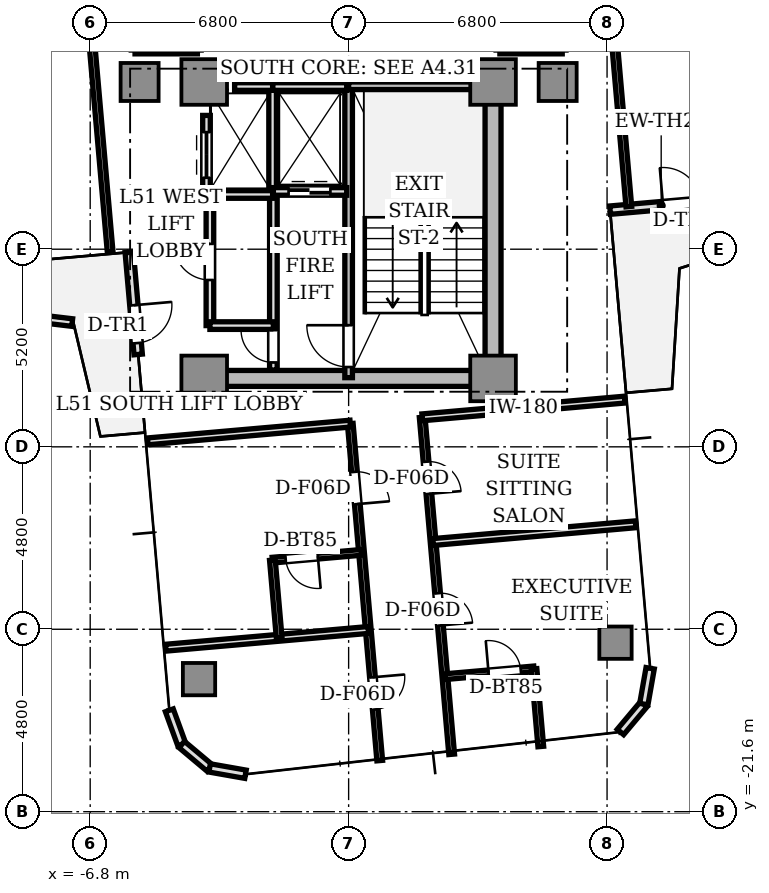
"""IFC4 building model, lengths in metres.
Left out: names, types, materials, properties, quantities, classifications, styles, units other than length and angle.
Written with IfcOpenShell. Run it as: python <this file> out.ifc"""

import sys

from ifc_helpers import new_model, si_unit, direction, frame, frame_2d, origin, origin_2d, place, context, subcontext, project, spatial, rectangle, extrude, source, transform, mapped, element, fill, save


model = new_model("IFC4")
c1 = context("Model", 3, precision=1e-05, world=origin(), true_north=direction((0.0, 1.0)))
c2 = subcontext(c1, "Body", "Model", "MODEL_VIEW")
j1 = project(units=[si_unit("LENGTHUNIT", "METRE"), si_unit("PLANEANGLEUNIT", "RADIAN")], contexts=[c1])
p1 = place(None, origin())
s1 = spatial("IfcSite", under=j1, at=p1, CompositionType="ELEMENT")
p2 = place(p1, origin())
s2 = spatial("IfcBuilding", under=s1, at=p2, CompositionType="ELEMENT")
p3 = place(p2, frame((0.0, 0.0, 185.25)))
s3 = spatial("IfcBuildingStorey", under=s2, at=p3, CompositionType="ELEMENT", Elevation=185.25)
p4 = place(p3, frame((-3.55, -10.2, 0.0), z_axis=(0.0, 0.0, 1.0), x_axis=(1.0, 0.0, 0.0)))
e1 = element("IfcWall", 1, at=p4, inside=s3, PredefinedType="SHEAR", context=c2, shape_type="SweptSolid", body=[
    extrude(rectangle(XDim=7.1, YDim=0.42, at=frame_2d((3.55, 0.0))), origin(), (0.0, 0.0, 1.0), 3.11),
])
p5 = place(p3, frame((3.8, -9.75, 0.0), z_axis=(0.0, 0.0, 1.0), x_axis=(0.0, 1.0, 0.0)))
e2 = element("IfcWall", 2, at=p5, inside=s3, PredefinedType="SHEAR", context=c2, shape_type="SweptSolid", body=[
    extrude(rectangle(XDim=6.9, YDim=0.42, at=frame_2d((3.45, 0.0))), origin(), (0.0, 0.0, 1.0), 3.11),
])
m1 = source(origin(), c2, "Body", "SweptSolid", [
    extrude(rectangle(XDim=1.2, YDim=1.2, at=origin_2d()), origin(), (0.0, 0.0, 1.0), 3.11),
])
for number, where, z_axis, x_axis in (
    (3, (-3.8, -2.4, 0.0), (0.0, 0.0, 1.0), (1.0, 0.0, 0.0)),
    (4, (3.8, -2.4, 0.0), (0.0, 0.0, 1.0), (1.0, 0.0, 0.0)),
    (5, (-3.8, -10.2, 0.0), (0.0, 0.0, 1.0), (1.0, 0.0, 0.0)),
    (6, (3.8, -10.2, 0.0), (0.0, 0.0, 1.0), (1.0, 0.0, 0.0)),
):
    element("IfcColumn", number, at=place(p3, frame(where, z_axis=z_axis, x_axis=x_axis)), inside=s3, PredefinedType="COLUMN", context=c2, shape_type="MappedRepresentation", body=[
        mapped(m1, transform((0.0, 0.0, 0.0), scale=1.0)),
    ])
m2 = source(origin(), c2, "Body", "SweptSolid", [
    extrude(rectangle(XDim=1.0, YDim=1.0, at=origin_2d()), origin(), (0.0, 0.0, 1.0), 3.11),
])
for number, where, z_axis, x_axis in (
    (7, (5.5, -2.4, 0.0), (0.0, 0.0, 1.0), (1.0, 0.0, 0.0)),
    (8, (-5.5, -2.4, 0.0), (0.0, 0.0, 1.0), (1.0, 0.0, 0.0)),
):
    element("IfcColumn", number, at=place(p3, frame(where, z_axis=z_axis, x_axis=x_axis)), inside=s3, PredefinedType="COLUMN", context=c2, shape_type="MappedRepresentation", body=[
        mapped(m2, transform((0.0, 0.0, 0.0), scale=1.0)),
    ])
m3 = source(origin(), c2, "Body", "SweptSolid", [
    extrude(rectangle(XDim=0.85, YDim=0.85, at=origin_2d()), origin(), (0.0, 0.0, 1.0), 3.11),
])
for number, where, z_axis, x_axis in (
    (9, (-3.936, -18.112, 0.0), (0.0, 0.0, 1.0), (1.0, 0.0, 0.0)),
    (10, (7.022, -17.153, 0.0), (0.0, 0.0, 1.0), (1.0, 0.0, 0.0)),
):
    element("IfcColumn", number, at=place(p3, frame(where, z_axis=z_axis, x_axis=x_axis)), inside=s3, PredefinedType="COLUMN", context=c2, shape_type="MappedRepresentation", body=[
        mapped(m3, transform((0.0, 0.0, 0.0), scale=1.0)),
    ])
p6 = place(p3, frame((6.879, -5.772, 0.0), z_axis=(0.0, 0.0, 1.0), x_axis=(0.996193619346, 0.087168071984, 0.0)))
e11 = element("IfcWall", 11, at=p6, inside=s3, PredefinedType="STANDARD", context=c2, shape_type="SweptSolid", body=[
    extrude(rectangle(XDim=2.7, YDim=0.22, at=frame_2d((1.35, 0.0))), origin(), (0.0, 0.0, 1.0), 3.11),
])
p7 = place(p6, frame((1.4, 0.0, 0.0)))
e12 = element("IfcOpeningElement", 12, at=p7, cuts=e11, PredefinedType="OPENING", context=c2, shape_type="SweptSolid", body=[
    extrude(rectangle(XDim=1.0, YDim=2.2, at=frame_2d((0.5, 1.1))), frame((0.0, 0.12, 0.0), z_axis=(0.0, -1.0, 0.0), x_axis=(1.0, 0.0, 0.0)), (0.0, 0.0, 1.0), 0.24),
])
p8 = place(p3, frame((-5.772, -6.879, 0.0), z_axis=(0.0, 0.0, 1.0), x_axis=(0.087168071984, -0.996193619346, 0.0)))
e13 = element("IfcWall", 13, at=p8, inside=s3, PredefinedType="STANDARD", context=c2, shape_type="SweptSolid", body=[
    extrude(rectangle(XDim=2.7, YDim=0.22, at=frame_2d((1.35, 0.0))), origin(), (0.0, 0.0, 1.0), 3.11),
])
p9 = place(p8, frame((1.4, 0.0, 0.0)))
e14 = element("IfcOpeningElement", 14, at=p9, cuts=e13, PredefinedType="OPENING", context=c2, shape_type="SweptSolid", body=[
    extrude(rectangle(XDim=1.0, YDim=2.2, at=frame_2d((0.5, 1.1))), frame((0.0, 0.12, 0.0), z_axis=(0.0, -1.0, 0.0), x_axis=(1.0, 0.0, 0.0)), (0.0, 0.0, 1.0), 0.24),
])
p10 = place(p3, frame((-4.718, -18.933, 0.0), z_axis=(0.0, 0.0, 1.0), x_axis=(0.34188635151, -0.939741306239, 0.0)))
e15 = element("IfcWall", 15, at=p10, inside=s3, PredefinedType="STANDARD", context=c2, shape_type="SweptSolid", body=[
    extrude(rectangle(XDim=0.958, YDim=0.22, at=frame_2d((0.479, 0.0))), origin(), (0.0, 0.0, 1.0), 3.11),
])
for number, where, z_axis, x_axis in (
    (16, (-4.39, -19.833, 0.0), (0.0, 0.0, 1.0), (0.766, -0.643, 0.0)),
    (17, (-3.657, -20.449, 0.0), (0.0, 0.0, 1.0), (0.985, -0.174, 0.0)),
):
    element("IfcWall", number, at=place(p3, frame(where, z_axis=z_axis, x_axis=x_axis)), inside=s3, PredefinedType="STANDARD", context=c2, shape_type="SweptSolid", body=[
        extrude(rectangle(XDim=0.958, YDim=0.22, at=frame_2d((0.479, 0.0))), origin(), (0.0, 0.0, 1.0), 3.11),
    ])
for number, where, z_axis, x_axis in (
    (18, (7.152, -19.503, 0.0), (0.0, 0.0, 1.0), (0.643, 0.766, 0.0)),
    (19, (7.768, -18.769, 0.0), (0.0, 0.0, 1.0), (0.174, 0.985, 0.0)),
):
    element("IfcWall", number, at=place(p3, frame(where, z_axis=z_axis, x_axis=x_axis)), inside=s3, PredefinedType="STANDARD", context=c2, shape_type="SweptSolid", body=[
        extrude(rectangle(XDim=0.958, YDim=0.22, at=frame_2d((0.479, 0.0))), origin(), (0.0, 0.0, 1.0), 3.11),
    ])
p11 = place(p3, frame((-9.104, -8.512, 0.0), z_axis=(0.0, 0.0, 1.0), x_axis=(0.993023408226, -0.117917389369, 0.0)))
e20 = element("IfcWall", 20, at=p11, inside=s3, PredefinedType="PARAPET", context=c2, shape_type="SweptSolid", body=[
    extrude(rectangle(XDim=1.843, YDim=0.2, at=frame_2d((0.921, 0.0))), origin(), (0.0, 0.0, 1.0), 0.65),
])
p12 = place(p3, frame((0.0, -10.18, 0.0), z_axis=(0.0, 0.0, 1.0), x_axis=(0.0, 1.0, 0.0)))
e21 = element("IfcWall", 21, at=p12, inside=s3, PredefinedType="SOLIDWALL", context=c2, shape_type="SweptSolid", body=[
    extrude(rectangle(XDim=7.68, YDim=0.2, at=frame_2d((3.84, 0.0))), origin(), (0.0, 0.0, 1.0), 3.11),
])
p13 = place(p12, frame((0.28, 0.0, 0.0)))
e22 = element("IfcOpeningElement", 22, at=p13, cuts=e21, PredefinedType="OPENING", context=c2, shape_type="SweptSolid", body=[
    extrude(rectangle(XDim=1.1, YDim=2.15, at=frame_2d((0.55, 1.075))), frame((0.0, 0.11, 0.0), z_axis=(0.0, -1.0, 0.0), x_axis=(1.0, 0.0, 0.0)), (0.0, 0.0, 1.0), 0.22),
])
p14 = place(p3, frame((0.0, -2.5, 0.0), z_axis=(0.0, 0.0, 1.0), x_axis=(1.0, 0.0, 0.0)))
e23 = element("IfcWall", 23, at=p14, inside=s3, PredefinedType="SOLIDWALL", context=c2, shape_type="SweptSolid", body=[
    extrude(rectangle(XDim=3.72, YDim=0.2, at=frame_2d((1.86, 0.0))), origin(), (0.0, 0.0, 1.0), 3.11),
])
p15 = place(p3, frame((-1.98, -9.98, 0.0), z_axis=(0.0, 0.0, 1.0), x_axis=(0.0, 1.0, 0.0)))
e24 = element("IfcWall", 24, at=p15, inside=s3, PredefinedType="SOLIDWALL", context=c2, shape_type="SweptSolid", body=[
    extrude(rectangle(XDim=4.66, YDim=0.2, at=frame_2d((2.33, 0.0))), origin(), (0.0, 0.0, 1.0), 2.66),
])
p16 = place(p15, frame((0.2, 0.0, 0.0)))
e25 = element("IfcOpeningElement", 25, at=p16, cuts=e24, PredefinedType="OPENING", context=c2, shape_type="SweptSolid", body=[
    extrude(rectangle(XDim=0.85, YDim=2.1, at=frame_2d((0.425, 1.05))), frame((0.0, 0.11, 0.0), z_axis=(0.0, -1.0, 0.0), x_axis=(1.0, 0.0, 0.0)), (0.0, 0.0, 1.0), 0.22),
])
p17 = place(p3, frame((-2.0, -5.28, 0.0), z_axis=(0.0, 0.0, 1.0), x_axis=(0.0, 1.0, 0.0)))
e26 = element("IfcWall", 26, at=p17, inside=s3, PredefinedType="SOLIDWALL", context=c2, shape_type="SweptSolid", body=[
    extrude(rectangle(XDim=2.78, YDim=0.2, at=frame_2d((1.39, 0.0))), origin(), (0.0, 0.0, 1.0), 2.66),
])
p18 = place(p3, frame((-2.0, -2.52, 0.0), z_axis=(0.0, 0.0, 1.0), x_axis=(1.0, 0.0, 0.0)))
e27 = element("IfcWall", 27, at=p18, inside=s3, PredefinedType="SOLIDWALL", context=c2, shape_type="SweptSolid", body=[
    extrude(rectangle(XDim=1.95, YDim=0.2, at=frame_2d((0.975, 0.0))), origin(), (0.0, 0.0, 1.0), 2.66),
])
p19 = place(p3, frame((-1.98, -5.28, 0.0), z_axis=(0.0, 0.0, 1.0), x_axis=(1.0, 0.0, 0.0)))
e28 = element("IfcWall", 28, at=p19, inside=s3, PredefinedType="SOLIDWALL", context=c2, shape_type="SweptSolid", body=[
    extrude(rectangle(XDim=1.93, YDim=0.2, at=frame_2d((0.965, 0.0))), origin(), (0.0, 0.0, 1.0), 2.66),
])
p20 = place(p19, frame((0.4, 0.0, 0.0)))
e29 = element("IfcOpeningElement", 29, at=p20, cuts=e28, PredefinedType="OPENING", context=c2, shape_type="SweptSolid", body=[
    extrude(rectangle(XDim=1.1, YDim=2.2, at=frame_2d((0.55, 1.1))), frame((0.0, 0.11, 0.0), z_axis=(0.0, -1.0, 0.0), x_axis=(1.0, 0.0, 0.0)), (0.0, 0.0, 1.0), 0.22),
])
p21 = place(p3, frame((-3.0, -2.52, 0.0), z_axis=(0.0, 0.0, 1.0), x_axis=(1.0, 0.0, 0.0)))
e30 = element("IfcWall", 30, at=p21, inside=s3, PredefinedType="SOLIDWALL", context=c2, shape_type="SweptSolid", body=[
    extrude(rectangle(XDim=1.0, YDim=0.2, at=frame_2d((0.5, 0.0))), origin(), (0.0, 0.0, 1.0), 2.66),
])
p22 = place(p3, frame((-3.74, -5.36, 0.0), z_axis=(0.0, 0.0, 1.0), x_axis=(1.0, 0.0, 0.0)))
e31 = element("IfcWall", 31, at=p22, inside=s3, PredefinedType="SOLIDWALL", context=c2, shape_type="SweptSolid", body=[
    extrude(rectangle(XDim=1.74, YDim=0.2, at=frame_2d((0.87, 0.0))), origin(), (0.0, 0.0, 1.0), 2.66),
])
p23 = place(p3, frame((-3.74, -5.36, 0.0), z_axis=(0.0, 0.0, 1.0), x_axis=(0.0, 1.0, 0.0)))
e32 = element("IfcWall", 32, at=p23, inside=s3, PredefinedType="SOLIDWALL", context=c2, shape_type="SweptSolid", body=[
    extrude(rectangle(XDim=2.08, YDim=0.2, at=frame_2d((1.04, 0.0))), origin(), (0.0, 0.0, 1.0), 2.66),
])
p24 = place(p23, frame((0.44, 0.0, 0.0)))
e33 = element("IfcOpeningElement", 33, at=p24, cuts=e32, PredefinedType="OPENING", context=c2, shape_type="SweptSolid", body=[
    extrude(rectangle(XDim=1.2, YDim=2.2, at=frame_2d((0.6, 1.1))), frame((0.0, 0.11, 0.0), z_axis=(0.0, -1.0, 0.0), x_axis=(1.0, 0.0, 0.0)), (0.0, 0.0, 1.0), 0.22),
])
for number, where, z_axis, x_axis in (
    (34, (3.98, -1.56, 0.0), (0.0, 0.0, 1.0), (1.0, 0.0, 0.0)),
    (35, (-5.62, -1.56, 0.0), (0.0, 0.0, 1.0), (1.0, 0.0, 0.0)),
):
    element("IfcWall", number, at=place(p3, frame(where, z_axis=z_axis, x_axis=x_axis)), inside=s3, PredefinedType="SOLIDWALL", context=c2, shape_type="SweptSolid", body=[
        extrude(rectangle(XDim=1.64, YDim=0.2, at=frame_2d((0.82, 0.0))), origin(), (0.0, 0.0, 1.0), 2.66),
    ])
p25 = place(p3, frame((-3.65, -8.81, 0.0), z_axis=(0.0, 0.0, 1.0), x_axis=(0.0, 1.0, 0.0)))
e36 = element("IfcWall", 36, at=p25, inside=s3, PredefinedType="SOLIDWALL", context=c2, shape_type="SweptSolid", body=[
    extrude(rectangle(XDim=3.43, YDim=0.2, at=frame_2d((1.715, 0.0))), origin(), (0.0, 0.0, 1.0), 2.66),
])
p26 = place(p25, frame((1.2, 0.0, 0.0)))
e37 = element("IfcOpeningElement", 37, at=p26, cuts=e36, PredefinedType="OPENING", context=c2, shape_type="SweptSolid", body=[
    extrude(rectangle(XDim=0.95, YDim=2.15, at=frame_2d((0.475, 1.075))), frame((0.0, 0.11, 0.0), z_axis=(0.0, -1.0, 0.0), x_axis=(1.0, 0.0, 0.0)), (0.0, 0.0, 1.0), 0.22),
])
p27 = place(p3, frame((-3.65, -8.81, 0.0), z_axis=(0.0, 0.0, 1.0), x_axis=(1.0, 0.0, 0.0)))
e38 = element("IfcWall", 38, at=p27, inside=s3, PredefinedType="SOLIDWALL", context=c2, shape_type="SweptSolid", body=[
    extrude(rectangle(XDim=1.67, YDim=0.2, at=frame_2d((0.835, 0.0))), origin(), (0.0, 0.0, 1.0), 2.66),
])
p28 = place(p3, frame((7.373, -5.679, 0.0), z_axis=(0.0, 0.0, 1.0), x_axis=(-0.087154691724, 0.996194790044, 0.0)))
e39 = element("IfcWall", 39, at=p28, inside=s3, PredefinedType="PARTITIONING", context=c2, shape_type="SweptSolid", body=[
    extrude(rectangle(XDim=12.6, YDim=0.15, at=frame_2d((6.3, 0.0))), origin(), (0.0, 0.0, 1.0), 2.66),
])
p29 = place(p28, frame((5.5, 0.0, 0.0)))
e40 = element("IfcOpeningElement", 40, at=p29, cuts=e39, PredefinedType="OPENING", context=c2, shape_type="SweptSolid", body=[
    extrude(rectangle(XDim=1.6, YDim=2.25, at=frame_2d((0.8, 1.125))), frame((0.0, 0.085, 0.0), z_axis=(0.0, -1.0, 0.0), x_axis=(1.0, 0.0, 0.0)), (0.0, 0.0, 1.0), 0.17),
])
p30 = place(p3, frame((-7.373, 5.679, 0.0), z_axis=(0.0, 0.0, 1.0), x_axis=(0.087154691724, -0.996194790044, 0.0)))
e41 = element("IfcWall", 41, at=p30, inside=s3, PredefinedType="PARTITIONING", context=c2, shape_type="SweptSolid", body=[
    extrude(rectangle(XDim=12.6, YDim=0.15, at=frame_2d((6.3, 0.0))), origin(), (0.0, 0.0, 1.0), 2.66),
])
p31 = place(p30, frame((5.5, 0.0, 0.0)))
e42 = element("IfcOpeningElement", 42, at=p31, cuts=e41, PredefinedType="OPENING", context=c2, shape_type="SweptSolid", body=[
    extrude(rectangle(XDim=1.6, YDim=2.25, at=frame_2d((0.8, 1.125))), frame((0.0, 0.085, 0.0), z_axis=(0.0, -1.0, 0.0), x_axis=(1.0, 0.0, 0.0)), (0.0, 0.0, 1.0), 0.17),
])
p32 = place(p3, frame((1.936, -11.224, 0.0), z_axis=(0.0, 0.0, 1.0), x_axis=(0.087151636982, -0.996195057291, 0.0)))
e43 = element("IfcWall", 43, at=p32, inside=s3, PredefinedType="PARTITIONING", context=c2, shape_type="SweptSolid", body=[
    extrude(rectangle(XDim=8.9, YDim=0.15, at=frame_2d((4.45, 0.0))), origin(), (0.0, 0.0, 1.0), 2.66),
])
p33 = place(p32, frame((1.172, 0.0, 0.0)))
e44 = element("IfcOpeningElement", 44, at=p33, cuts=e43, PredefinedType="OPENING", context=c2, shape_type="SweptSolid", body=[
    extrude(rectangle(XDim=0.85, YDim=2.1, at=frame_2d((0.425, 1.05))), frame((0.0, 0.085, 0.0), z_axis=(0.0, -1.0, 0.0), x_axis=(1.0, 0.0, 0.0)), (0.0, 0.0, 1.0), 0.17),
])
p34 = place(p32, frame((4.647, 0.0, 0.0)))
e45 = element("IfcOpeningElement", 45, at=p34, cuts=e43, PredefinedType="OPENING", context=c2, shape_type="SweptSolid", body=[
    extrude(rectangle(XDim=0.85, YDim=2.1, at=frame_2d((0.425, 1.05))), frame((0.0, 0.085, 0.0), z_axis=(0.0, -1.0, 0.0), x_axis=(1.0, 0.0, 0.0)), (0.0, 0.0, 1.0), 0.17),
])
p35 = place(p3, frame((0.043, -11.39, 0.0), z_axis=(0.0, 0.0, 1.0), x_axis=(0.087178860582, -0.996192675273, 0.0)))
e46 = element("IfcWall", 46, at=p35, inside=s3, PredefinedType="PARTITIONING", context=c2, shape_type="SweptSolid", body=[
    extrude(rectangle(XDim=8.9, YDim=0.15, at=frame_2d((4.45, 0.0))), origin(), (0.0, 0.0, 1.0), 2.66),
])
p36 = place(p35, frame((1.275, 0.0, 0.0)))
e47 = element("IfcOpeningElement", 47, at=p36, cuts=e46, PredefinedType="OPENING", context=c2, shape_type="SweptSolid", body=[
    extrude(rectangle(XDim=0.85, YDim=2.1, at=frame_2d((0.425, 1.05))), frame((0.0, 0.085, 0.0), z_axis=(0.0, -1.0, 0.0), x_axis=(1.0, 0.0, 0.0)), (0.0, 0.0, 1.0), 0.17),
])
p37 = place(p35, frame((6.7, 0.0, 0.0)))
e48 = element("IfcOpeningElement", 48, at=p37, cuts=e46, PredefinedType="OPENING", context=c2, shape_type="SweptSolid", body=[
    extrude(rectangle(XDim=0.85, YDim=2.1, at=frame_2d((0.425, 1.05))), frame((0.0, 0.085, 0.0), z_axis=(0.0, -1.0, 0.0), x_axis=(1.0, 0.0, 0.0)), (0.0, 0.0, 1.0), 0.17),
])
for number, where, z_axis, x_axis in (
    (49, (1.936, -11.224, 0.0), (0.0, 0.0, 1.0), (0.996, 0.087, 0.0)),
    (50, (-5.287, -11.856, 0.0), (0.0, 0.0, 1.0), (0.996, 0.087, 0.0)),
    (51, (2.223, -14.504, 0.0), (0.0, 0.0, 1.0), (0.996, 0.087, 0.0)),
):
    element("IfcWall", number, at=place(p3, frame(where, z_axis=z_axis, x_axis=x_axis)), inside=s3, PredefinedType="PARTITIONING", context=c2, shape_type="SweptSolid", body=[
        extrude(rectangle(XDim=5.35, YDim=0.18, at=frame_2d((2.675, 0.0))), origin(), (0.0, 0.0, 1.0), 2.66),
    ])
p38 = place(p3, frame((2.533, -18.048, 0.0), z_axis=(0.0, 0.0, 1.0), x_axis=(0.996197656711, 0.087121918963, 0.0)))
e52 = element("IfcWall", 52, at=p38, inside=s3, PredefinedType="PARTITIONING", context=c2, shape_type="SweptSolid", body=[
    extrude(rectangle(XDim=2.354, YDim=0.15, at=frame_2d((1.177, 0.0))), origin(), (0.0, 0.0, 1.0), 2.66),
])
p39 = place(p38, frame((1.154, 0.0, 0.0)))
e53 = element("IfcOpeningElement", 53, at=p39, cuts=e52, PredefinedType="OPENING", context=c2, shape_type="SweptSolid", body=[
    extrude(rectangle(XDim=0.85, YDim=2.1, at=frame_2d((0.425, 1.05))), frame((0.0, 0.085, 0.0), z_axis=(0.0, -1.0, 0.0), x_axis=(1.0, 0.0, 0.0)), (0.0, 0.0, 1.0), 0.17),
])
p40 = place(p3, frame((4.878, -17.843, 0.0), z_axis=(0.0, 0.0, 1.0), x_axis=(0.087174336889, -0.99619307114, 0.0)))
e54 = element("IfcWall", 54, at=p40, inside=s3, PredefinedType="PARTITIONING", context=c2, shape_type="SweptSolid", body=[
    extrude(rectangle(XDim=2.05, YDim=0.15, at=frame_2d((1.025, 0.0))), origin(), (0.0, 0.0, 1.0), 2.66),
])
p41 = place(p3, frame((0.518, -16.819, 0.0), z_axis=(0.0, 0.0, 1.0), x_axis=(-0.996194212812, -0.087161289348, 0.0)))
e55 = element("IfcWall", 55, at=p41, inside=s3, PredefinedType="PARTITIONING", context=c2, shape_type="SweptSolid", body=[
    extrude(rectangle(XDim=5.35, YDim=0.18, at=frame_2d((2.675, 0.0))), origin(), (0.0, 0.0, 1.0), 2.66),
])
p42 = place(p3, frame((0.339, -14.777, 0.0), z_axis=(0.0, 0.0, 1.0), x_axis=(-0.996197656711, -0.087121918963, 0.0)))
e56 = element("IfcWall", 56, at=p42, inside=s3, PredefinedType="PARTITIONING", context=c2, shape_type="SweptSolid", body=[
    extrude(rectangle(XDim=2.354, YDim=0.15, at=frame_2d((1.177, 0.0))), origin(), (0.0, 0.0, 1.0), 2.66),
])
p43 = place(p42, frame((1.154, 0.0, 0.0)))
e57 = element("IfcOpeningElement", 57, at=p43, cuts=e56, PredefinedType="OPENING", context=c2, shape_type="SweptSolid", body=[
    extrude(rectangle(XDim=0.85, YDim=2.1, at=frame_2d((0.425, 1.05))), frame((0.0, 0.085, 0.0), z_axis=(0.0, -1.0, 0.0), x_axis=(1.0, 0.0, 0.0)), (0.0, 0.0, 1.0), 0.17),
])
p44 = place(p3, frame((-2.006, -14.982, 0.0), z_axis=(0.0, 0.0, 1.0), x_axis=(0.087174336889, -0.99619307114, 0.0)))
e58 = element("IfcWall", 58, at=p44, inside=s3, PredefinedType="PARTITIONING", context=c2, shape_type="SweptSolid", body=[
    extrude(rectangle(XDim=2.05, YDim=0.15, at=frame_2d((1.025, 0.0))), origin(), (0.0, 0.0, 1.0), 2.66),
])
m4 = source(origin(), c2, "Body", "SweptSolid", [
    extrude(rectangle(XDim=1.0, YDim=0.05, at=origin_2d()), origin(), (0.0, 0.0, 1.0), 2.2),
])
p45 = place(p7, frame((0.5, 0.0, 0.0)))
e59 = element("IfcDoor", 59, at=p45, inside=s3, OperationType="SINGLE_SWING_LEFT", PredefinedType="DOOR", context=c2, shape_type="MappedRepresentation", body=[
    mapped(m4, transform((0.0, 0.0, 0.0), scale=1.0)),
])
fill(e12, e59)
p46 = place(p9, frame((0.5, 0.0, 0.0)))
e60 = element("IfcDoor", 60, at=p46, inside=s3, OperationType="SINGLE_SWING_LEFT", PredefinedType="DOOR", context=c2, shape_type="MappedRepresentation", body=[
    mapped(m4, transform((0.0, 0.0, 0.0), scale=1.0)),
])
fill(e14, e60)
m5 = source(origin(), c2, "Body", "SweptSolid", [
    extrude(rectangle(XDim=1.1, YDim=0.05, at=origin_2d()), origin(), (0.0, 0.0, 1.0), 2.15),
])
p47 = place(p13, frame((0.55, 0.0, 0.0)))
e61 = element("IfcDoor", 61, at=p47, inside=s3, OperationType="SINGLE_SWING_RIGHT", PredefinedType="DOOR", context=c2, shape_type="MappedRepresentation", body=[
    mapped(m5, transform((0.0, 0.0, 0.0), scale=1.0)),
])
fill(e22, e61)
m6 = source(origin(), c2, "Body", "SweptSolid", [
    extrude(rectangle(XDim=0.85, YDim=0.05, at=origin_2d()), origin(), (0.0, 0.0, 1.0), 2.1),
])
p48 = place(p16, frame((0.425, 0.0, 0.0)))
e62 = element("IfcDoor", 62, at=p48, inside=s3, OperationType="SINGLE_SWING_RIGHT", PredefinedType="DOOR", context=c2, shape_type="MappedRepresentation", body=[
    mapped(m6, transform((0.0, 0.0, 0.0), scale=1.0)),
])
fill(e25, e62)
m7 = source(origin(), c2, "Body", "SweptSolid", [
    extrude(rectangle(XDim=1.1, YDim=0.05, at=origin_2d()), origin(), (0.0, 0.0, 1.0), 2.2),
])
p49 = place(p20, frame((0.55, 0.0, 0.0)))
e63 = element("IfcDoor", 63, at=p49, inside=s3, OperationType="DOUBLE_DOOR_SLIDING", PredefinedType="DOOR", context=c2, shape_type="MappedRepresentation", body=[
    mapped(m7, transform((0.0, 0.0, 0.0), scale=1.0)),
])
fill(e29, e63)
m8 = source(origin(), c2, "Body", "SweptSolid", [
    extrude(rectangle(XDim=1.2, YDim=0.05, at=origin_2d()), origin(), (0.0, 0.0, 1.0), 2.2),
])
p50 = place(p24, frame((0.6, 0.0, 0.0)))
e64 = element("IfcDoor", 64, at=p50, inside=s3, OperationType="DOUBLE_DOOR_SLIDING", PredefinedType="DOOR", context=c2, shape_type="MappedRepresentation", body=[
    mapped(m8, transform((0.0, 0.0, 0.0), scale=1.0)),
])
fill(e33, e64)
m9 = source(origin(), c2, "Body", "SweptSolid", [
    extrude(rectangle(XDim=0.95, YDim=0.05, at=origin_2d()), origin(), (0.0, 0.0, 1.0), 2.15),
])
p51 = place(p26, frame((0.475, 0.0, 0.0)))
e65 = element("IfcDoor", 65, at=p51, inside=s3, OperationType="SINGLE_SWING_RIGHT", PredefinedType="DOOR", context=c2, shape_type="MappedRepresentation", body=[
    mapped(m9, transform((0.0, 0.0, 0.0), scale=1.0)),
])
fill(e37, e65)
p52 = place(p33, frame((0.425, 0.0, 0.0)))
e66 = element("IfcDoor", 66, at=p52, inside=s3, OperationType="SINGLE_SWING_RIGHT", PredefinedType="DOOR", context=c2, shape_type="MappedRepresentation", body=[
    mapped(m6, transform((0.0, 0.0, 0.0), scale=1.0)),
])
fill(e44, e66)
p53 = place(p39, frame((0.425, 0.0, 0.0)))
e67 = element("IfcDoor", 67, at=p53, inside=s3, OperationType="SINGLE_SWING_LEFT", PredefinedType="DOOR", context=c2, shape_type="MappedRepresentation", body=[
    mapped(m6, transform((0.0, 0.0, 0.0), scale=1.0)),
])
fill(e53, e67)
p54 = place(p34, frame((0.425, 0.0, 0.0)))
e68 = element("IfcDoor", 68, at=p54, inside=s3, OperationType="SINGLE_SWING_RIGHT", PredefinedType="DOOR", context=c2, shape_type="MappedRepresentation", body=[
    mapped(m6, transform((0.0, 0.0, 0.0), scale=1.0)),
])
fill(e45, e68)
p55 = place(p43, frame((0.425, 0.0, 0.0)))
e69 = element("IfcDoor", 69, at=p55, inside=s3, OperationType="SINGLE_SWING_LEFT", PredefinedType="DOOR", context=c2, shape_type="MappedRepresentation", body=[
    mapped(m6, transform((0.0, 0.0, 0.0), scale=1.0)),
])
fill(e57, e69)
p56 = place(p36, frame((0.425, 0.0, 0.0)))
e70 = element("IfcDoor", 70, at=p56, inside=s3, OperationType="SINGLE_SWING_RIGHT", PredefinedType="DOOR", context=c2, shape_type="MappedRepresentation", body=[
    mapped(m6, transform((0.0, 0.0, 0.0), scale=1.0)),
])
fill(e47, e70)
p57 = place(p37, frame((0.425, 0.0, 0.0)))
e71 = element("IfcDoor", 71, at=p57, inside=s3, OperationType="SINGLE_SWING_LEFT", PredefinedType="DOOR", context=c2, shape_type="MappedRepresentation", body=[
    mapped(m6, transform((0.0, 0.0, 0.0), scale=1.0)),
])
fill(e48, e71)
save(model, sys.argv[1])
